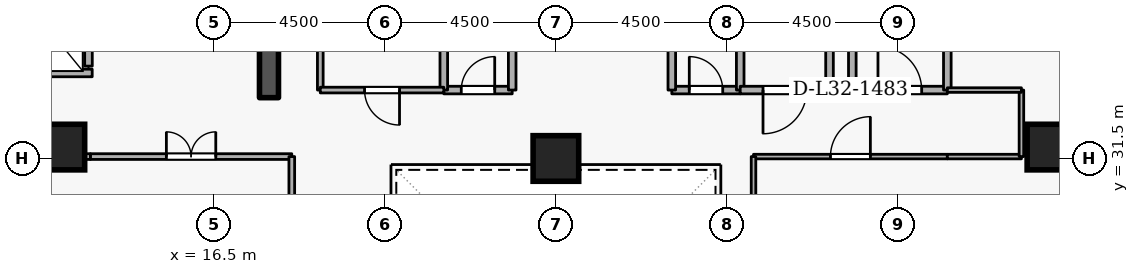
"""IFC4 building model, lengths in metres.
Left out: names, types, materials, properties, quantities, classifications, styles, units other than length and angle.
Written with IfcOpenShell. Run it as: python <this file> out.ifc"""

import sys

from ifc_helpers import new_model, si_unit, direction, frame, frame_2d, origin, origin_2d, place, context, subcontext, project, spatial, rectangle, extrude, element, fill, save


model = new_model("IFC4")
c1 = context("Model", 3, precision=1e-05, world=origin(), true_north=direction((0.0, 1.0)))
c2 = subcontext(c1, "Body", "Model", "MODEL_VIEW")
j1 = project(units=[si_unit("LENGTHUNIT", "METRE"), si_unit("PLANEANGLEUNIT", "RADIAN")], contexts=[c1])
p1 = place(None, origin())
s1 = spatial("IfcSite", under=j1, at=p1, CompositionType="ELEMENT")
p2 = place(p1, origin())
s2 = spatial("IfcBuilding", under=s1, at=p2, CompositionType="ELEMENT")
p3 = place(p2, frame((0.0, 0.0, 123.3)))
s3 = spatial("IfcBuildingStorey", under=s2, at=p3, CompositionType="ELEMENT", Elevation=123.3)
p4 = place(p3, frame((17.95, 33.1, 0.0), z_axis=(0.0, 0.0, 1.0), x_axis=(0.0, 1.0, 0.0)))
e1 = element("IfcWall", 1, at=p4, inside=s3, PredefinedType="SHEAR", context=c2, shape_type="SweptSolid", body=[
    extrude(rectangle(XDim=5.8, YDim=0.5, at=frame_2d((2.9, 0.0))), origin(), (0.0, 0.0, 1.0), 3.6),
])
for number, where, z_axis, x_axis in (
    (2, (12.5, 31.8, 0.0), (0.0, 0.0, 1.0), (1.0, 0.0, 0.0)),
    (3, (38.5, 31.8, 0.0), (0.0, 0.0, 1.0), (1.0, 0.0, 0.0)),
    (4, (25.5, 31.5, 0.0), (0.0, 0.0, 1.0), (1.0, 0.0, 0.0)),
):
    element("IfcColumn", number, at=place(p3, frame(where, z_axis=z_axis, x_axis=x_axis)), inside=s3, PredefinedType="COLUMN", context=c2, shape_type="SweptSolid", body=[
        extrude(rectangle(XDim=1.2, YDim=1.2, at=origin_2d()), origin(), (0.0, 0.0, 1.0), 3.6),
    ])
p5 = place(p3, frame((13.2, 33.93, 0.0), z_axis=(0.0, 0.0, 1.0), x_axis=(0.0, 1.0, 0.0)))
e5 = element("IfcWall", 5, at=p5, inside=s3, PredefinedType="STANDARD", context=c2, shape_type="SweptSolid", body=[
    extrude(rectangle(XDim=1.94, YDim=0.2, at=frame_2d((0.97, 0.0))), origin(), (0.0, 0.0, 1.0), 3.34),
])
p6 = place(p5, frame((0.46, 0.0, 0.0)))
e6 = element("IfcOpeningElement", 6, at=p6, cuts=e5, PredefinedType="OPENING", context=c2, shape_type="SweptSolid", body=[
    extrude(rectangle(XDim=1.02, YDim=2.06, at=frame_2d((0.51, 1.03))), frame((0.0, 0.11, 0.0), z_axis=(0.0, -1.0, 0.0), x_axis=(1.0, 0.0, 0.0)), (0.0, 0.0, 1.0), 0.22),
])
p7 = place(p3, frame((11.002, 33.75, 0.0), z_axis=(0.0, 0.0, 1.0), x_axis=(1.0, 0.0, 0.0)))
e7 = element("IfcWall", 7, at=p7, inside=s3, PredefinedType="STANDARD", context=c2, shape_type="SweptSolid", body=[
    extrude(rectangle(XDim=2.296, YDim=0.2, at=frame_2d((1.148, 0.0))), origin(), (0.0, 0.0, 1.0), 3.34),
])
p8 = place(p3, frame((33.3, 33.3, 0.0), z_axis=(0.0, 0.0, 1.0), x_axis=(1.0, 0.0, 0.0)))
e8 = element("IfcWall", 8, at=p8, inside=s3, PredefinedType="STANDARD", context=c2, shape_type="SweptSolid", body=[
    extrude(rectangle(XDim=2.5, YDim=0.2, at=frame_2d((1.25, 0.0))), origin(), (0.0, 0.0, 1.0), 3.34),
])
p9 = place(p8, frame((0.675, 0.0, 0.0)))
e9 = element("IfcOpeningElement", 9, at=p9, cuts=e8, PredefinedType="OPENING", context=c2, shape_type="SweptSolid", body=[
    extrude(rectangle(XDim=1.15, YDim=2.1, at=frame_2d((0.575, 1.05))), frame((0.0, 0.11, 0.0), z_axis=(0.0, -1.0, 0.0), x_axis=(1.0, 0.0, 0.0)), (0.0, 0.0, 1.0), 0.22),
])
p10 = place(p3, frame((35.8, 33.3, 0.0), z_axis=(0.0, 0.0, 1.0), x_axis=(0.0, 1.0, 0.0)))
e10 = element("IfcWall", 10, at=p10, inside=s3, PredefinedType="STANDARD", context=c2, shape_type="SweptSolid", body=[
    extrude(rectangle(XDim=5.7, YDim=0.2, at=frame_2d((2.85, 0.0))), origin(), (0.0, 0.0, 1.0), 3.34),
])
p11 = place(p3, frame((33.3, 35.6, 0.0), z_axis=(0.0, 0.0, 1.0), x_axis=(0.0, -1.0, 0.0)))
e11 = element("IfcWall", 11, at=p11, inside=s3, PredefinedType="STANDARD", context=c2, shape_type="SweptSolid", body=[
    extrude(rectangle(XDim=2.3, YDim=0.2, at=frame_2d((1.15, 0.0))), origin(), (0.0, 0.0, 1.0), 2.545),
])
p12 = place(p3, frame((22.55, 33.3, 0.0), z_axis=(0.0, 0.0, 1.0), x_axis=(1.0, 0.0, 0.0)))
e12 = element("IfcWall", 12, at=p12, inside=s3, PredefinedType="STANDARD", context=c2, shape_type="SweptSolid", body=[
    extrude(rectangle(XDim=1.8, YDim=0.2, at=frame_2d((0.9, 0.0))), origin(), (0.0, 0.0, 1.0), 3.34),
])
p13 = place(p12, frame((0.46, 0.0, 0.0)))
e13 = element("IfcOpeningElement", 13, at=p13, cuts=e12, PredefinedType="OPENING", context=c2, shape_type="SweptSolid", body=[
    extrude(rectangle(XDim=0.88, YDim=2.04, at=frame_2d((0.44, 1.02))), frame((0.0, 0.11, 0.0), z_axis=(0.0, -1.0, 0.0), x_axis=(1.0, 0.0, 0.0)), (0.0, 0.0, 1.0), 0.22),
])
for number, where, z_axis, x_axis in (
    (14, (24.35, 33.3, 0.0), (0.0, 0.0, 1.0), (0.0, 1.0, 0.0)),
    (15, (22.55, 35.35, 0.0), (0.0, 0.0, 1.0), (0.0, -1.0, 0.0)),
):
    element("IfcWall", number, at=place(p3, frame(where, z_axis=z_axis, x_axis=x_axis)), inside=s3, PredefinedType="STANDARD", context=c2, shape_type="SweptSolid", body=[
        extrude(rectangle(XDim=2.05, YDim=0.2, at=frame_2d((1.025, 0.0))), origin(), (0.0, 0.0, 1.0), 3.34),
    ])
p14 = place(p3, frame((28.55, 33.3, 0.0), z_axis=(0.0, 0.0, 1.0), x_axis=(1.0, 0.0, 0.0)))
e16 = element("IfcWall", 16, at=p14, inside=s3, PredefinedType="STANDARD", context=c2, shape_type="SweptSolid", body=[
    extrude(rectangle(XDim=1.8, YDim=0.2, at=frame_2d((0.9, 0.0))), origin(), (0.0, 0.0, 1.0), 3.34),
])
p15 = place(p14, frame((0.46, 0.0, 0.0)))
e17 = element("IfcOpeningElement", 17, at=p15, cuts=e16, PredefinedType="OPENING", context=c2, shape_type="SweptSolid", body=[
    extrude(rectangle(XDim=0.88, YDim=2.04, at=frame_2d((0.44, 1.02))), frame((0.0, 0.11, 0.0), z_axis=(0.0, -1.0, 0.0), x_axis=(1.0, 0.0, 0.0)), (0.0, 0.0, 1.0), 0.22),
])
for number, where, z_axis, x_axis in (
    (18, (30.35, 33.3, 0.0), (0.0, 0.0, 1.0), (0.0, 1.0, 0.0)),
    (19, (28.55, 35.35, 0.0), (0.0, 0.0, 1.0), (0.0, -1.0, 0.0)),
):
    element("IfcWall", number, at=place(p3, frame(where, z_axis=z_axis, x_axis=x_axis)), inside=s3, PredefinedType="STANDARD", context=c2, shape_type="SweptSolid", body=[
        extrude(rectangle(XDim=2.05, YDim=0.2, at=frame_2d((1.025, 0.0))), origin(), (0.0, 0.0, 1.0), 3.34),
    ])
p16 = place(p3, frame((32.7, 35.35, 0.0), z_axis=(0.0, 0.0, 1.0), x_axis=(0.0, -1.0, 0.0)))
e20 = element("IfcWall", 20, at=p16, inside=s3, PredefinedType="STANDARD", context=c2, shape_type="SweptSolid", body=[
    extrude(rectangle(XDim=2.05, YDim=0.2, at=frame_2d((1.025, 0.0))), origin(), (0.0, 0.0, 1.0), 2.545),
])
p17 = place(p3, frame((32.7, 33.3, 0.0), z_axis=(0.0, 0.0, 1.0), x_axis=(-1.0, 0.0, 0.0)))
e21 = element("IfcWall", 21, at=p17, inside=s3, PredefinedType="STANDARD", context=c2, shape_type="SweptSolid", body=[
    extrude(rectangle(XDim=2.35, YDim=0.2, at=frame_2d((1.175, 0.0))), origin(), (0.0, 0.0, 1.0), 3.34),
])
p18 = place(p17, frame((0.6, 0.0, 0.0)))
e22 = element("IfcOpeningElement", 22, at=p18, cuts=e21, PredefinedType="OPENING", context=c2, shape_type="SweptSolid", body=[
    extrude(rectangle(XDim=1.15, YDim=2.1, at=frame_2d((0.575, 1.05))), frame((0.0, 0.11, 0.0), z_axis=(0.0, -1.0, 0.0), x_axis=(1.0, 0.0, 0.0)), (0.0, 0.0, 1.0), 0.22),
])
p19 = place(p3, frame((19.3, 33.3, 0.0), z_axis=(0.0, 0.0, 1.0), x_axis=(0.0, 1.0, 0.0)))
e23 = element("IfcWall", 23, at=p19, inside=s3, PredefinedType="PARTITIONING", context=c2, shape_type="SweptSolid", body=[
    extrude(rectangle(XDim=2.05, YDim=0.15, at=frame_2d((1.025, 0.0))), origin(), (0.0, 0.0, 1.0), 3.34),
])
p20 = place(p3, frame((22.55, 33.3, 0.0), z_axis=(0.0, 0.0, 1.0), x_axis=(-1.0, 0.0, 0.0)))
e24 = element("IfcWall", 24, at=p20, inside=s3, PredefinedType="PARTITIONING", context=c2, shape_type="SweptSolid", body=[
    extrude(rectangle(XDim=3.25, YDim=0.15, at=frame_2d((1.625, 0.0))), origin(), (0.0, 0.0, 1.0), 3.34),
])
p21 = place(p20, frame((1.165, 0.0, 0.0)))
e25 = element("IfcOpeningElement", 25, at=p21, cuts=e24, PredefinedType="OPENING", context=c2, shape_type="SweptSolid", body=[
    extrude(rectangle(XDim=0.92, YDim=2.08, at=frame_2d((0.46, 1.04))), frame((0.0, 0.085, 0.0), z_axis=(0.0, -1.0, 0.0), x_axis=(1.0, 0.0, 0.0)), (0.0, 0.0, 1.0), 0.17),
])
p22 = place(p3, frame((13.25, 31.55, 0.0), z_axis=(0.0, 0.0, 1.0), x_axis=(1.0, 0.0, 0.0)))
e26 = element("IfcWall", 26, at=p22, inside=s3, PredefinedType="PARTITIONING", context=c2, shape_type="SweptSolid", body=[
    extrude(rectangle(XDim=5.3, YDim=0.15, at=frame_2d((2.65, 0.0))), origin(), (0.0, 0.0, 1.0), 3.34),
])
p23 = place(p22, frame((2.0, 0.0, 0.0)))
e27 = element("IfcOpeningElement", 27, at=p23, cuts=e26, PredefinedType="OPENING", context=c2, shape_type="SweptSolid", body=[
    extrude(rectangle(XDim=1.3, YDim=2.12, at=frame_2d((0.65, 1.06))), frame((0.0, 0.085, 0.0), z_axis=(0.0, -1.0, 0.0), x_axis=(1.0, 0.0, 0.0)), (0.0, 0.0, 1.0), 0.17),
])
p24 = place(p3, frame((18.55, 31.55, 0.0), z_axis=(0.0, 0.0, 1.0), x_axis=(0.0, -1.0, 0.0)))
e28 = element("IfcWall", 28, at=p24, inside=s3, PredefinedType="PARTITIONING", context=c2, shape_type="SweptSolid", body=[
    extrude(rectangle(XDim=4.55, YDim=0.15, at=frame_2d((2.275, 0.0))), origin(), (0.0, 0.0, 1.0), 3.34),
])
p25 = place(p3, frame((10.9, 31.55, 0.0), z_axis=(0.0, 0.0, 1.0), x_axis=(1.0, 0.0, 0.0)))
e29 = element("IfcWall", 29, at=p25, inside=s3, PredefinedType="PARTITIONING", context=c2, shape_type="SweptSolid", body=[
    extrude(rectangle(XDim=2.35, YDim=0.15, at=frame_2d((1.175, 0.0))), origin(), (0.0, 0.0, 1.0), 3.34),
])
p26 = place(p3, frame((30.7, 31.55, 0.0), z_axis=(0.0, 0.0, 1.0), x_axis=(1.0, 0.0, 0.0)))
e30 = element("IfcWall", 30, at=p26, inside=s3, PredefinedType="PARTITIONING", context=c2, shape_type="SweptSolid", body=[
    extrude(rectangle(XDim=5.1, YDim=0.12, at=frame_2d((2.55, 0.0))), origin(), (0.0, 0.0, 1.0), 3.34),
])
p27 = place(p26, frame((2.025, 0.0, 0.0)))
e31 = element("IfcOpeningElement", 31, at=p27, cuts=e30, PredefinedType="OPENING", context=c2, shape_type="SweptSolid", body=[
    extrude(rectangle(XDim=1.05, YDim=2.1, at=frame_2d((0.525, 1.05))), frame((0.0, 0.07, 0.0), z_axis=(0.0, -1.0, 0.0), x_axis=(1.0, 0.0, 0.0)), (0.0, 0.0, 1.0), 0.14),
])
p28 = place(p3, frame((35.8, 31.55, 0.0), z_axis=(0.0, 0.0, 1.0), x_axis=(1.0, 0.0, 0.0)))
e32 = element("IfcWall", 32, at=p28, inside=s3, PredefinedType="PARTITIONING", context=c2, shape_type="SweptSolid", body=[
    extrude(rectangle(XDim=1.95, YDim=0.12, at=frame_2d((0.975, 0.0))), origin(), (0.0, 0.0, 1.0), 3.34),
])
p29 = place(p3, frame((37.75, 31.55, 0.0), z_axis=(0.0, 0.0, 1.0), x_axis=(0.0, 1.0, 0.0)))
e33 = element("IfcWall", 33, at=p29, inside=s3, PredefinedType="PARTITIONING", context=c2, shape_type="SweptSolid", body=[
    extrude(rectangle(XDim=1.75, YDim=0.12, at=frame_2d((0.875, 0.0))), origin(), (0.0, 0.0, 1.0), 3.34),
])
p30 = place(p3, frame((37.75, 33.3, 0.0), z_axis=(0.0, 0.0, 1.0), x_axis=(-1.0, 0.0, 0.0)))
e34 = element("IfcWall", 34, at=p30, inside=s3, PredefinedType="PARTITIONING", context=c2, shape_type="SweptSolid", body=[
    extrude(rectangle(XDim=1.95, YDim=0.12, at=frame_2d((0.975, 0.0))), origin(), (0.0, 0.0, 1.0), 3.34),
])
p31 = place(p3, frame((30.7, 27.0, 0.0), z_axis=(0.0, 0.0, 1.0), x_axis=(0.0, 1.0, 0.0)))
e35 = element("IfcWall", 35, at=p31, inside=s3, PredefinedType="PARTITIONING", context=c2, shape_type="SweptSolid", body=[
    extrude(rectangle(XDim=4.55, YDim=0.12, at=frame_2d((2.275, 0.0))), origin(), (0.0, 0.0, 1.0), 3.34),
])
p32 = place(p9, origin())
e36 = element("IfcDoor", 36, at=p32, inside=s3, OperationType="SINGLE_SWING_LEFT", PredefinedType="DOOR", context=c2, shape_type="SweptSolid", body=[
    extrude(rectangle(XDim=1.15, YDim=2.1, at=frame_2d((0.575, 1.05))), frame((0.0, 0.025, 0.0), z_axis=(0.0, -1.0, 0.0), x_axis=(1.0, 0.0, 0.0)), (0.0, 0.0, 1.0), 0.05),
])
fill(e9, e36)
p33 = place(p13, origin())
e37 = element("IfcDoor", 37, at=p33, inside=s3, OperationType="SINGLE_SWING_RIGHT", PredefinedType="DOOR", context=c2, shape_type="SweptSolid", body=[
    extrude(rectangle(XDim=0.88, YDim=2.04, at=frame_2d((0.44, 1.02))), frame((0.0, 0.025, 0.0), z_axis=(0.0, -1.0, 0.0), x_axis=(1.0, 0.0, 0.0)), (0.0, 0.0, 1.0), 0.05),
])
fill(e13, e37)
p34 = place(p15, origin())
e38 = element("IfcDoor", 38, at=p34, inside=s3, OperationType="SINGLE_SWING_LEFT", PredefinedType="DOOR", context=c2, shape_type="SweptSolid", body=[
    extrude(rectangle(XDim=0.88, YDim=2.04, at=frame_2d((0.44, 1.02))), frame((0.0, 0.025, 0.0), z_axis=(0.0, -1.0, 0.0), x_axis=(1.0, 0.0, 0.0)), (0.0, 0.0, 1.0), 0.05),
])
fill(e17, e38)
p35 = place(p21, origin())
e39 = element("IfcDoor", 39, at=p35, inside=s3, OperationType="SINGLE_SWING_LEFT", PredefinedType="DOOR", context=c2, shape_type="SweptSolid", body=[
    extrude(rectangle(XDim=0.92, YDim=2.08, at=frame_2d((0.46, 1.04))), frame((0.0, 0.025, 0.0), z_axis=(0.0, -1.0, 0.0), x_axis=(1.0, 0.0, 0.0)), (0.0, 0.0, 1.0), 0.05),
])
fill(e25, e39)
p36 = place(p18, origin())
e40 = element("IfcDoor", 40, at=p36, inside=s3, OperationType="SINGLE_SWING_RIGHT", PredefinedType="DOOR", context=c2, shape_type="SweptSolid", body=[
    extrude(rectangle(XDim=1.15, YDim=2.1, at=frame_2d((0.575, 1.05))), frame((0.0, 0.025, 0.0), z_axis=(0.0, -1.0, 0.0), x_axis=(1.0, 0.0, 0.0)), (0.0, 0.0, 1.0), 0.05),
])
fill(e22, e40)
p37 = place(p23, origin())
e41 = element("IfcDoor", 41, at=p37, inside=s3, OperationType="DOUBLE_DOOR_SINGLE_SWING", PredefinedType="DOOR", context=c2, shape_type="SweptSolid", body=[
    extrude(rectangle(XDim=1.3, YDim=2.12, at=frame_2d((0.65, 1.06))), frame((0.0, 0.025, 0.0), z_axis=(0.0, -1.0, 0.0), x_axis=(1.0, 0.0, 0.0)), (0.0, 0.0, 1.0), 0.05),
])
fill(e27, e41)
p38 = place(p27, origin())
e42 = element("IfcDoor", 42, at=p38, inside=s3, OperationType="SINGLE_SWING_RIGHT", PredefinedType="DOOR", context=c2, shape_type="SweptSolid", body=[
    extrude(rectangle(XDim=1.05, YDim=2.1, at=frame_2d((0.525, 1.05))), frame((0.0, 0.025, 0.0), z_axis=(0.0, -1.0, 0.0), x_axis=(1.0, 0.0, 0.0)), (0.0, 0.0, 1.0), 0.05),
])
fill(e31, e42)
save(model, sys.argv[1])
